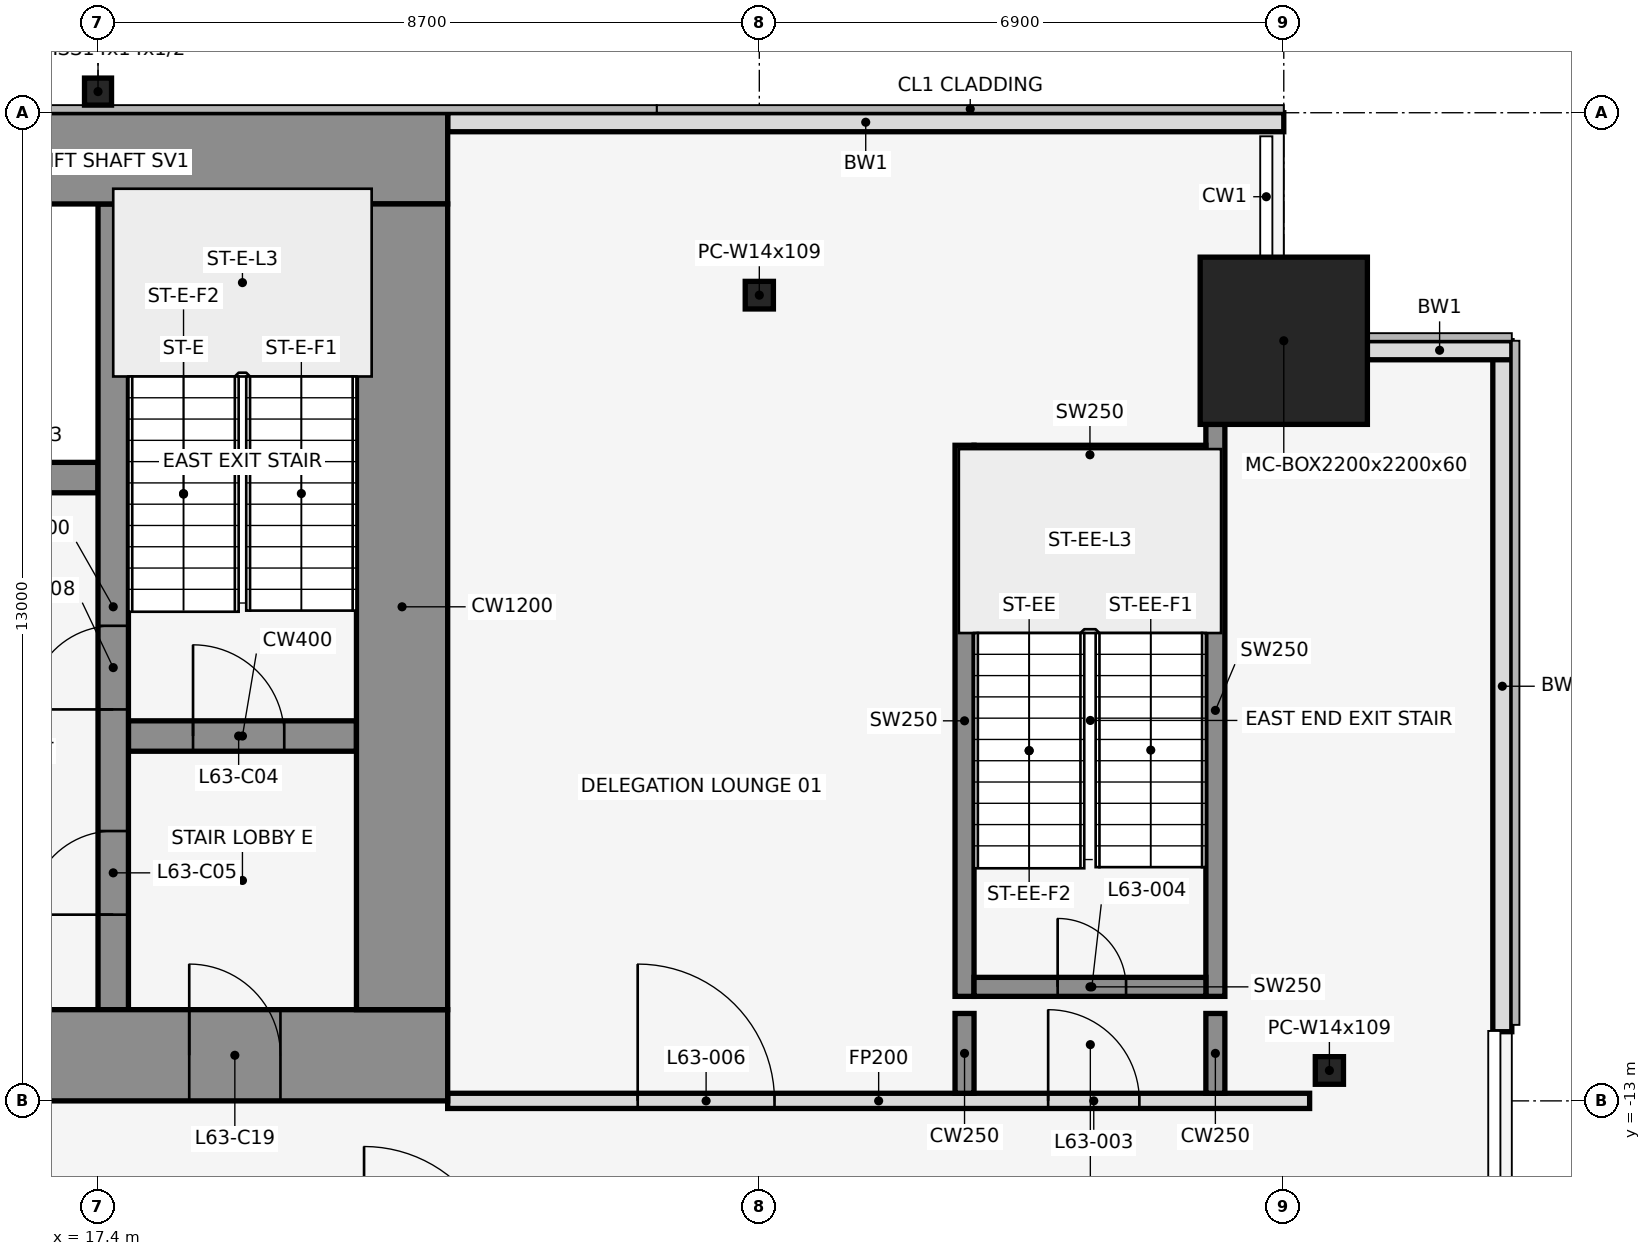
"""IFC4 building model, lengths in metres.
Left out: names, types, materials, properties, quantities, classifications, styles, units other than length and angle.
Written with IfcOpenShell. Run it as: python <this file> out.ifc"""

import sys

from ifc_helpers import new_model, si_unit, direction, frame, frame_2d, origin, origin_2d, place, context, subcontext, project, spatial, rectangle, hollow_rectangle, i_section, extrude, element, fill, save


model = new_model("IFC4")
c1 = context("Model", 3, precision=1e-05, world=origin(), true_north=direction((0.0, 1.0)))
c2 = subcontext(c1, "Body", "Model", "MODEL_VIEW")
j1 = project(units=[si_unit("LENGTHUNIT", "METRE"), si_unit("PLANEANGLEUNIT", "RADIAN")], contexts=[c1])
p1 = place(None, origin())
s1 = spatial("IfcSite", under=j1, at=p1, CompositionType="ELEMENT")
p2 = place(p1, origin())
s2 = spatial("IfcBuilding", under=s1, at=p2, CompositionType="ELEMENT")
p3 = place(p2, frame((0.0, 0.0, 279.2)))
s3 = spatial("IfcBuildingStorey", under=s2, at=p3, CompositionType="ELEMENT", Elevation=279.2)
p4 = place(p3, frame((26.1, -2.4, 0.0), z_axis=(0.0, 0.0, 1.0), x_axis=(1.0, 0.0, 0.0)))
e1 = element("IfcColumn", 1, at=p4, inside=s3, PredefinedType="COLUMN", context=c2, shape_type="SweptSolid", body=[
    extrude(i_section(OverallWidth=0.371, OverallDepth=0.363, WebThickness=0.013, FlangeThickness=0.022, at=origin_2d()), origin(), (0.0, 0.0, 1.0), 4.2),
])
p5 = place(p3, frame((33.0, -3.0, 0.0), z_axis=(0.0, 0.0, 1.0), x_axis=(1.0, 0.0, 0.0)))
e2 = element("IfcColumn", 2, at=p5, inside=s3, PredefinedType="COLUMN", context=c2, shape_type="SweptSolid", body=[
    extrude(hollow_rectangle(XDim=2.2, YDim=2.2, WallThickness=0.06, at=origin_2d()), origin(), (0.0, 0.0, 1.0), 4.2),
])
p6 = place(p3, frame((17.4, 0.278, 0.0), z_axis=(0.0, 0.0, 1.0), x_axis=(1.0, 0.0, 0.0)))
e3 = element("IfcColumn", 3, at=p6, inside=s3, PredefinedType="COLUMN", context=c2, shape_type="SweptSolid", body=[
    extrude(hollow_rectangle(XDim=0.356, YDim=0.356, WallThickness=0.012, at=origin_2d()), origin(), (0.0, 0.0, 1.0), 4.2),
])
p7 = place(p3, frame((33.6, -12.6, 0.0), z_axis=(0.0, 0.0, 1.0), x_axis=(1.0, 0.0, 0.0)))
e4 = element("IfcColumn", 4, at=p7, inside=s3, PredefinedType="COLUMN", context=c2, shape_type="SweptSolid", body=[
    extrude(i_section(OverallWidth=0.371, OverallDepth=0.363, WebThickness=0.013, FlangeThickness=0.022, at=origin_2d()), origin(), (0.0, 0.0, 1.0), 4.2),
])
p8 = place(p3, frame((33.0, -0.125, 0.0), z_axis=(0.0, 0.0, 1.0), x_axis=(-1.0, 0.0, 0.0)))
e5 = element("IfcWall", 5, at=p8, inside=s3, PredefinedType="STANDARD", context=c2, shape_type="SweptSolid", body=[
    extrude(rectangle(XDim=11.0, YDim=0.25, at=frame_2d((5.5, 0.0))), origin(), (0.0, 0.0, 1.0), 4.05),
])
p9 = place(p3, frame((35.875, -12.09, 0.0), z_axis=(0.0, 0.0, 1.0), x_axis=(0.0, 1.0, 0.0)))
e6 = element("IfcWall", 6, at=p9, inside=s3, PredefinedType="STANDARD", context=c2, shape_type="SweptSolid", body=[
    extrude(rectangle(XDim=9.09, YDim=0.25, at=frame_2d((4.545, 0.0))), origin(), (0.0, 0.0, 1.0), 4.05),
])
p10 = place(p3, frame((36.0, -3.125, 0.0), z_axis=(0.0, 0.0, 1.0), x_axis=(-1.0, 0.0, 0.0)))
e7 = element("IfcWall", 7, at=p10, inside=s3, PredefinedType="STANDARD", context=c2, shape_type="SweptSolid", body=[
    extrude(rectangle(XDim=1.9, YDim=0.25, at=frame_2d((0.95, 0.0))), origin(), (0.0, 0.0, 1.0), 4.05),
])
p11 = place(p3, frame((28.8, -11.625, 0.0), z_axis=(0.0, 0.0, 1.0), x_axis=(0.0, 1.0, 0.0)))
e8 = element("IfcWall", 8, at=p11, inside=s3, PredefinedType="SHEAR", context=c2, shape_type="SweptSolid", body=[
    extrude(rectangle(XDim=7.25, YDim=0.25, at=frame_2d((3.625, 0.0))), origin(), (0.0, 0.0, 1.0), 4.2),
])
p12 = place(p3, frame((32.1, -11.625, 0.0), z_axis=(0.0, 0.0, 1.0), x_axis=(0.0, 1.0, 0.0)))
e9 = element("IfcWall", 9, at=p12, inside=s3, PredefinedType="SHEAR", context=c2, shape_type="SweptSolid", body=[
    extrude(rectangle(XDim=7.525, YDim=0.25, at=frame_2d((3.762, 0.0))), origin(), (0.0, 0.0, 1.0), 4.2),
])
p13 = place(p3, frame((28.925, -11.5, 0.0), z_axis=(0.0, 0.0, 1.0), x_axis=(1.0, 0.0, 0.0)))
e10 = element("IfcWall", 10, at=p13, inside=s3, PredefinedType="SHEAR", context=c2, shape_type="SweptSolid", body=[
    extrude(rectangle(XDim=3.05, YDim=0.25, at=frame_2d((1.525, 0.0))), origin(), (0.0, 0.0, 1.0), 4.2),
])
p14 = place(p13, frame((1.1, 0.0, 0.0)))
e11 = element("IfcOpeningElement", 11, at=p14, cuts=e10, PredefinedType="OPENING", context=c2, shape_type="SweptSolid", body=[
    extrude(rectangle(XDim=0.9, YDim=2.1, at=frame_2d((0.45, 1.05))), frame((0.0, 0.137, 0.0), z_axis=(0.0, -1.0, 0.0), x_axis=(1.0, 0.0, 0.0)), (0.0, 0.0, 1.0), 0.274),
])
p15 = place(p3, frame((28.925, -4.5, 0.0), z_axis=(0.0, 0.0, 1.0), x_axis=(1.0, 0.0, 0.0)))
e12 = element("IfcWall", 12, at=p15, inside=s3, PredefinedType="SHEAR", context=c2, shape_type="SweptSolid", body=[
    extrude(rectangle(XDim=3.05, YDim=0.25, at=frame_2d((1.525, 0.0))), origin(), (0.0, 0.0, 1.0), 4.2),
])
p16 = place(p3, frame((22.0, -13.0, 0.0), z_axis=(0.0, 0.0, 1.0), x_axis=(1.0, 0.0, 0.0)))
e13 = element("IfcWall", 13, at=p16, inside=s3, PredefinedType="PARTITIONING", context=c2, shape_type="SweptSolid", body=[
    extrude(rectangle(XDim=11.34, YDim=0.2, at=frame_2d((5.67, 0.0))), origin(), (0.0, 0.0, 1.0), 3.04),
])
p17 = place(p16, frame((7.9, 0.0, 0.0)))
e14 = element("IfcOpeningElement", 14, at=p17, cuts=e13, PredefinedType="OPENING", context=c2, shape_type="SweptSolid", body=[
    extrude(rectangle(XDim=1.2, YDim=2.1, at=frame_2d((0.6, 1.05))), frame((0.0, 0.112, 0.0), z_axis=(0.0, -1.0, 0.0), x_axis=(1.0, 0.0, 0.0)), (0.0, 0.0, 1.0), 0.224),
])
p18 = place(p16, frame((2.5, 0.0, 0.0)))
e15 = element("IfcOpeningElement", 15, at=p18, cuts=e13, PredefinedType="OPENING", context=c2, shape_type="SweptSolid", body=[
    extrude(rectangle(XDim=1.8, YDim=2.1, at=frame_2d((0.9, 1.05))), frame((0.0, 0.112, 0.0), z_axis=(0.0, -1.0, 0.0), x_axis=(1.0, 0.0, 0.0)), (0.0, 0.0, 1.0), 0.224),
])
for number, where, z_axis, x_axis in (
    (16, (28.8, -12.9, 0.0), (0.0, 0.0, 1.0), (0.0, 1.0, 0.0)),
    (17, (32.1, -12.9, 0.0), (0.0, 0.0, 1.0), (0.0, 1.0, 0.0)),
):
    element("IfcWall", number, at=place(p3, frame(where, z_axis=z_axis, x_axis=x_axis)), inside=s3, PredefinedType="SHEAR", context=c2, shape_type="SweptSolid", body=[
        extrude(rectangle(XDim=1.05, YDim=0.25, at=frame_2d((0.525, 0.0))), origin(), (0.0, 0.0, 1.0), 4.2),
    ])
p19 = place(p3, frame((17.8, -8.2, 0.0), z_axis=(0.0, 0.0, 1.0), x_axis=(1.0, 0.0, 0.0)))
e18 = element("IfcWall", 18, at=p19, inside=s3, PredefinedType="SHEAR", context=c2, shape_type="SweptSolid", body=[
    extrude(rectangle(XDim=3.0, YDim=0.4, at=frame_2d((1.5, 0.0))), origin(), (0.0, 0.0, 1.0), 4.2),
])
p20 = place(p19, frame((0.85, 0.0, 0.0)))
e19 = element("IfcOpeningElement", 19, at=p20, cuts=e18, PredefinedType="OPENING", context=c2, shape_type="SweptSolid", body=[
    extrude(rectangle(XDim=1.2, YDim=2.1, at=frame_2d((0.6, 1.05))), frame((0.0, 0.212, 0.0), z_axis=(0.0, -1.0, 0.0), x_axis=(1.0, 0.0, 0.0)), (0.0, 0.0, 1.0), 0.424),
])
p21 = place(p3, frame((3.8, -4.8, 0.0), z_axis=(0.0, 0.0, 1.0), x_axis=(1.0, 0.0, 0.0)))
e20 = element("IfcWall", 20, at=p21, inside=s3, PredefinedType="SHEAR", context=c2, shape_type="SweptSolid", body=[
    extrude(rectangle(XDim=13.6, YDim=0.4, at=frame_2d((6.8, 0.0))), origin(), (0.0, 0.0, 1.0), 4.2),
])
p22 = place(p21, frame((0.75, 0.0, 0.0)))
e21 = element("IfcOpeningElement", 21, at=p22, cuts=e20, PredefinedType="OPENING", context=c2, shape_type="SweptSolid", body=[
    extrude(rectangle(XDim=1.2, YDim=2.1, at=frame_2d((0.6, 1.05))), frame((0.0, 0.212, 0.0), z_axis=(0.0, -1.0, 0.0), x_axis=(1.0, 0.0, 0.0)), (0.0, 0.0, 1.0), 0.424),
])
p23 = place(p21, frame((3.65, 0.0, 0.0)))
e22 = element("IfcOpeningElement", 22, at=p23, cuts=e20, PredefinedType="OPENING", context=c2, shape_type="SweptSolid", body=[
    extrude(rectangle(XDim=1.2, YDim=2.1, at=frame_2d((0.6, 1.05))), frame((0.0, 0.212, 0.0), z_axis=(0.0, -1.0, 0.0), x_axis=(1.0, 0.0, 0.0)), (0.0, 0.0, 1.0), 0.424),
])
p24 = place(p21, frame((6.65, 0.0, 0.0)))
e23 = element("IfcOpeningElement", 23, at=p24, cuts=e20, PredefinedType="OPENING", context=c2, shape_type="SweptSolid", body=[
    extrude(rectangle(XDim=1.2, YDim=2.1, at=frame_2d((0.6, 1.05))), frame((0.0, 0.212, 0.0), z_axis=(0.0, -1.0, 0.0), x_axis=(1.0, 0.0, 0.0)), (0.0, 0.0, 1.0), 0.424),
])
p25 = place(p21, frame((9.45, 0.0, 0.0)))
e24 = element("IfcOpeningElement", 24, at=p25, cuts=e20, PredefinedType="OPENING", context=c2, shape_type="SweptSolid", body=[
    extrude(rectangle(XDim=1.1, YDim=2.1, at=frame_2d((0.55, 1.05))), frame((0.0, 0.212, 0.0), z_axis=(0.0, -1.0, 0.0), x_axis=(1.0, 0.0, 0.0)), (0.0, 0.0, 1.0), 0.424),
])
p26 = place(p21, frame((11.85, 0.0, 0.0)))
e25 = element("IfcOpeningElement", 25, at=p26, cuts=e20, PredefinedType="OPENING", context=c2, shape_type="SweptSolid", body=[
    extrude(rectangle(XDim=1.1, YDim=2.1, at=frame_2d((0.55, 1.05))), frame((0.0, 0.212, 0.0), z_axis=(0.0, -1.0, 0.0), x_axis=(1.0, 0.0, 0.0)), (0.0, 0.0, 1.0), 0.424),
])
p27 = place(p3, frame((17.6, -11.8, 0.0), z_axis=(0.0, 0.0, 1.0), x_axis=(0.0, 1.0, 0.0)))
e26 = element("IfcWall", 26, at=p27, inside=s3, PredefinedType="SHEAR", context=c2, shape_type="SweptSolid", body=[
    extrude(rectangle(XDim=10.6, YDim=0.4, at=frame_2d((5.3, 0.0))), origin(), (0.0, 0.0, 1.0), 4.2),
])
p28 = place(p27, frame((1.25, 0.0, 0.0)))
e27 = element("IfcOpeningElement", 27, at=p28, cuts=e26, PredefinedType="OPENING", context=c2, shape_type="SweptSolid", body=[
    extrude(rectangle(XDim=1.1, YDim=2.1, at=frame_2d((0.55, 1.05))), frame((0.0, 0.212, 0.0), z_axis=(0.0, -1.0, 0.0), x_axis=(1.0, 0.0, 0.0)), (0.0, 0.0, 1.0), 0.424),
])
p29 = place(p27, frame((3.95, 0.0, 0.0)))
e28 = element("IfcOpeningElement", 28, at=p29, cuts=e26, PredefinedType="OPENING", context=c2, shape_type="SweptSolid", body=[
    extrude(rectangle(XDim=1.1, YDim=2.1, at=frame_2d((0.55, 1.05))), frame((0.0, 0.212, 0.0), z_axis=(0.0, -1.0, 0.0), x_axis=(1.0, 0.0, 0.0)), (0.0, 0.0, 1.0), 0.424),
])
p30 = place(p3, frame((-22.0, -0.6, 0.0), z_axis=(0.0, 0.0, 1.0), x_axis=(1.0, 0.0, 0.0)))
e29 = element("IfcWall", 29, at=p30, inside=s3, PredefinedType="SHEAR", context=c2, shape_type="SweptSolid", body=[
    extrude(rectangle(XDim=44.0, YDim=1.2, at=frame_2d((22.0, 0.0))), origin(), (0.0, 0.0, 1.0), 4.2),
])
p31 = place(p30, frame((18.55, 0.0, 0.0)))
e30 = element("IfcOpeningElement", 30, at=p31, cuts=e29, PredefinedType="OPENING", context=c2, shape_type="SweptSolid", body=[
    extrude(rectangle(XDim=0.9, YDim=2.1, at=frame_2d((0.45, 1.05))), frame((0.0, 0.612, 0.0), z_axis=(0.0, -1.0, 0.0), x_axis=(1.0, 0.0, 0.0)), (0.0, 0.0, 1.0), 1.224),
])
p32 = place(p30, frame((24.55, 0.0, 0.0)))
e31 = element("IfcOpeningElement", 31, at=p32, cuts=e29, PredefinedType="OPENING", context=c2, shape_type="SweptSolid", body=[
    extrude(rectangle(XDim=0.9, YDim=2.1, at=frame_2d((0.45, 1.05))), frame((0.0, 0.612, 0.0), z_axis=(0.0, -1.0, 0.0), x_axis=(1.0, 0.0, 0.0)), (0.0, 0.0, 1.0), 1.224),
])
p33 = place(p3, frame((-22.0, -12.4, 0.0), z_axis=(0.0, 0.0, 1.0), x_axis=(1.0, 0.0, 0.0)))
e32 = element("IfcWall", 32, at=p33, inside=s3, PredefinedType="SHEAR", context=c2, shape_type="SweptSolid", body=[
    extrude(rectangle(XDim=44.0, YDim=1.2, at=frame_2d((22.0, 0.0))), origin(), (0.0, 0.0, 1.0), 4.2),
])
p34 = place(p33, frame((2.2, 0.0, 0.0)))
e33 = element("IfcOpeningElement", 33, at=p34, cuts=e32, PredefinedType="OPENING", context=c2, shape_type="SweptSolid", body=[
    extrude(rectangle(XDim=1.2, YDim=2.1, at=frame_2d((0.6, 1.05))), frame((0.0, 0.612, 0.0), z_axis=(0.0, -1.0, 0.0), x_axis=(1.0, 0.0, 0.0)), (0.0, 0.0, 1.0), 1.224),
])
p35 = place(p33, frame((21.4, 0.0, 0.0)))
e34 = element("IfcOpeningElement", 34, at=p35, cuts=e32, PredefinedType="OPENING", context=c2, shape_type="SweptSolid", body=[
    extrude(rectangle(XDim=1.2, YDim=2.1, at=frame_2d((0.6, 1.05))), frame((0.0, 0.612, 0.0), z_axis=(0.0, -1.0, 0.0), x_axis=(1.0, 0.0, 0.0)), (0.0, 0.0, 1.0), 1.224),
])
p36 = place(p33, frame((40.6, 0.0, 0.0)))
e35 = element("IfcOpeningElement", 35, at=p36, cuts=e32, PredefinedType="OPENING", context=c2, shape_type="SweptSolid", body=[
    extrude(rectangle(XDim=1.2, YDim=2.1, at=frame_2d((0.6, 1.05))), frame((0.0, 0.612, 0.0), z_axis=(0.0, -1.0, 0.0), x_axis=(1.0, 0.0, 0.0)), (0.0, 0.0, 1.0), 1.224),
])
p37 = place(p33, frame((16.0, 0.0, 0.0)))
e36 = element("IfcOpeningElement", 36, at=p37, cuts=e32, PredefinedType="OPENING", context=c2, shape_type="SweptSolid", body=[
    extrude(rectangle(XDim=1.8, YDim=2.1, at=frame_2d((0.9, 1.05))), frame((0.0, 0.612, 0.0), z_axis=(0.0, -1.0, 0.0), x_axis=(1.0, 0.0, 0.0)), (0.0, 0.0, 1.0), 1.224),
])
p38 = place(p33, frame((6.3, 0.0, 0.0)))
e37 = element("IfcOpeningElement", 37, at=p38, cuts=e32, PredefinedType="OPENING", context=c2, shape_type="SweptSolid", body=[
    extrude(rectangle(XDim=1.2, YDim=2.1, at=frame_2d((0.6, 1.05))), frame((0.0, 0.612, 0.0), z_axis=(0.0, -1.0, 0.0), x_axis=(1.0, 0.0, 0.0)), (0.0, 0.0, 1.0), 1.224),
])
p39 = place(p33, frame((26.2, 0.0, 0.0)))
e38 = element("IfcOpeningElement", 38, at=p39, cuts=e32, PredefinedType="OPENING", context=c2, shape_type="SweptSolid", body=[
    extrude(rectangle(XDim=1.8, YDim=2.1, at=frame_2d((0.9, 1.05))), frame((0.0, 0.612, 0.0), z_axis=(0.0, -1.0, 0.0), x_axis=(1.0, 0.0, 0.0)), (0.0, 0.0, 1.0), 1.224),
])
p40 = place(p33, frame((36.5, 0.0, 0.0)))
e39 = element("IfcOpeningElement", 39, at=p40, cuts=e32, PredefinedType="OPENING", context=c2, shape_type="SweptSolid", body=[
    extrude(rectangle(XDim=1.2, YDim=2.1, at=frame_2d((0.6, 1.05))), frame((0.0, 0.612, 0.0), z_axis=(0.0, -1.0, 0.0), x_axis=(1.0, 0.0, 0.0)), (0.0, 0.0, 1.0), 1.224),
])
p41 = place(p3, frame((21.4, -11.8, 0.0), z_axis=(0.0, 0.0, 1.0), x_axis=(0.0, 1.0, 0.0)))
e40 = element("IfcWall", 40, at=p41, inside=s3, PredefinedType="SHEAR", context=c2, shape_type="SweptSolid", body=[
    extrude(rectangle(XDim=10.6, YDim=1.2, at=frame_2d((5.3, 0.0))), origin(), (0.0, 0.0, 1.0), 4.2),
])
p42 = place(p17, origin())
e41 = element("IfcDoor", 41, at=p42, inside=s3, OperationType="SINGLE_SWING_RIGHT", PredefinedType="DOOR", context=c2, shape_type="SweptSolid", body=[
    extrude(rectangle(XDim=1.2, YDim=2.1, at=frame_2d((0.6, 1.05))), frame((0.0, 0.025, 0.0), z_axis=(0.0, -1.0, 0.0), x_axis=(1.0, 0.0, 0.0)), (0.0, 0.0, 1.0), 0.05),
])
fill(e14, e41)
p43 = place(p14, origin())
e42 = element("IfcDoor", 42, at=p43, inside=s3, OperationType="SINGLE_SWING_LEFT", PredefinedType="DOOR", context=c2, shape_type="SweptSolid", body=[
    extrude(rectangle(XDim=0.9, YDim=2.1, at=frame_2d((0.45, 1.05))), frame((0.0, 0.025, 0.0), z_axis=(0.0, -1.0, 0.0), x_axis=(1.0, 0.0, 0.0)), (0.0, 0.0, 1.0), 0.05),
])
fill(e11, e42)
p44 = place(p18, origin())
e43 = element("IfcDoor", 43, at=p44, inside=s3, OperationType="SINGLE_SWING_LEFT", PredefinedType="DOOR", context=c2, shape_type="SweptSolid", body=[
    extrude(rectangle(XDim=1.8, YDim=2.1, at=frame_2d((0.9, 1.05))), frame((0.0, 0.025, 0.0), z_axis=(0.0, -1.0, 0.0), x_axis=(1.0, 0.0, 0.0)), (0.0, 0.0, 1.0), 0.05),
])
fill(e15, e43)
p45 = place(p20, origin())
e44 = element("IfcDoor", 44, at=p45, inside=s3, OperationType="SINGLE_SWING_RIGHT", PredefinedType="DOOR", context=c2, shape_type="SweptSolid", body=[
    extrude(rectangle(XDim=1.2, YDim=2.1, at=frame_2d((0.6, 1.05))), frame((0.0, 0.025, 0.0), z_axis=(0.0, -1.0, 0.0), x_axis=(1.0, 0.0, 0.0)), (0.0, 0.0, 1.0), 0.05),
])
fill(e19, e44)
p46 = place(p28, origin())
e45 = element("IfcDoor", 45, at=p46, inside=s3, OperationType="SINGLE_SWING_LEFT", PredefinedType="DOOR", context=c2, shape_type="SweptSolid", body=[
    extrude(rectangle(XDim=1.1, YDim=2.1, at=frame_2d((0.55, 1.05))), frame((0.0, 0.025, 0.0), z_axis=(0.0, -1.0, 0.0), x_axis=(1.0, 0.0, 0.0)), (0.0, 0.0, 1.0), 0.05),
])
fill(e27, e45)
p47 = place(p29, origin())
e46 = element("IfcDoor", 46, at=p47, inside=s3, OperationType="SINGLE_SWING_RIGHT", PredefinedType="DOOR", context=c2, shape_type="SweptSolid", body=[
    extrude(rectangle(XDim=1.1, YDim=2.1, at=frame_2d((0.55, 1.05))), frame((0.0, 0.025, 0.0), z_axis=(0.0, -1.0, 0.0), x_axis=(1.0, 0.0, 0.0)), (0.0, 0.0, 1.0), 0.05),
])
fill(e28, e46)
p48 = place(p36, frame((1.2, 0.0, 0.0), z_axis=(0.0, 0.0, 1.0), x_axis=(-1.0, 0.0, 0.0)))
e47 = element("IfcDoor", 47, at=p48, inside=s3, OperationType="SINGLE_SWING_RIGHT", PredefinedType="DOOR", context=c2, shape_type="SweptSolid", body=[
    extrude(rectangle(XDim=1.2, YDim=2.1, at=frame_2d((0.6, 1.05))), frame((0.0, 0.025, 0.0), z_axis=(0.0, -1.0, 0.0), x_axis=(1.0, 0.0, 0.0)), (0.0, 0.0, 1.0), 0.05),
])
fill(e35, e47)
save(model, sys.argv[1])
